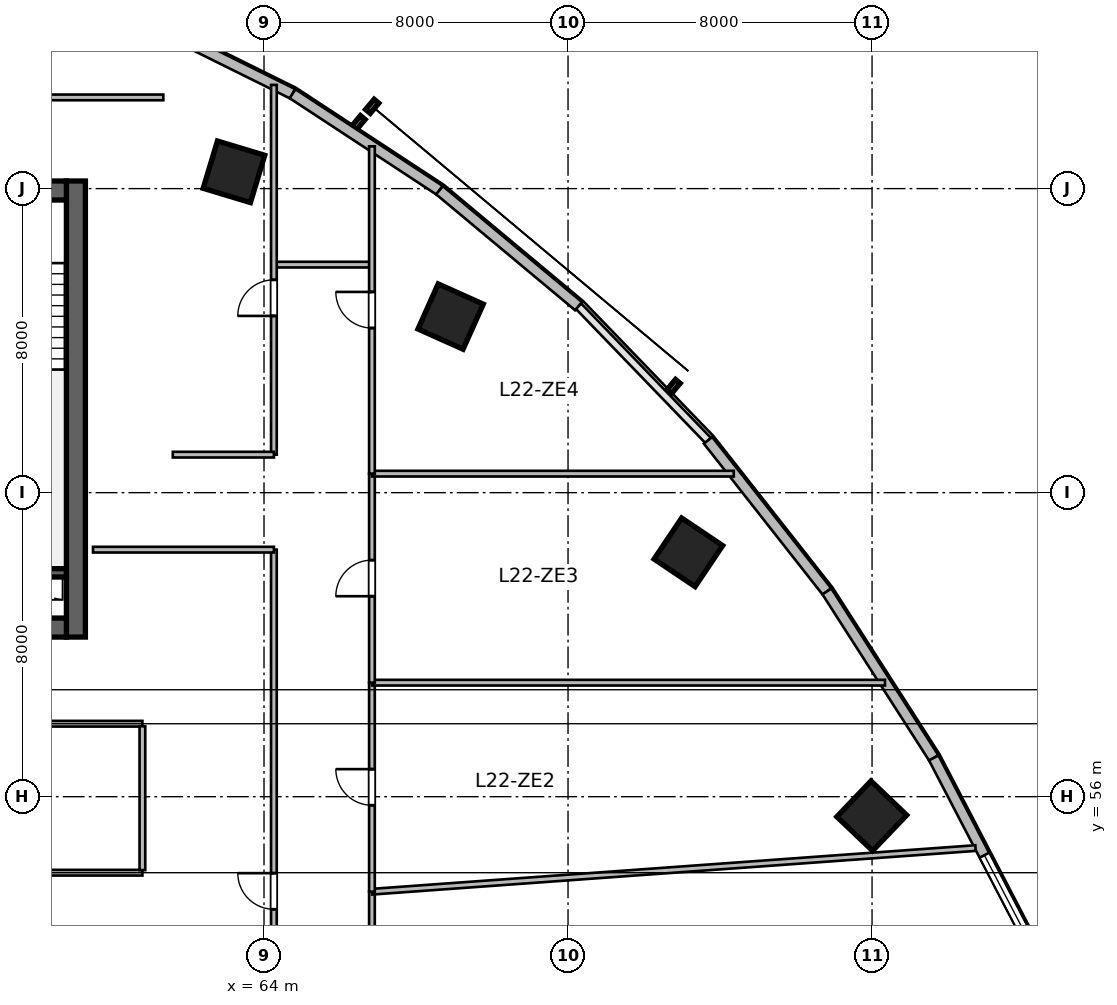
"""IFC4 building model, lengths in metres.
Left out: names, types, materials, properties, quantities, classifications, styles, units other than length and angle.
Written with IfcOpenShell. Run it as: python <this file> out.ifc"""

import sys

from ifc_helpers import new_model, si_unit, direction, frame, frame_2d, origin, origin_2d, place, context, subcontext, project, spatial, rectangle, extrude, source, transform, mapped, element, fill, save


model = new_model("IFC4")
c1 = context("Model", 3, precision=1e-05, world=origin(), true_north=direction((0.0, 1.0)))
c2 = subcontext(c1, "Body", "Model", "MODEL_VIEW")
j1 = project(units=[si_unit("LENGTHUNIT", "METRE"), si_unit("PLANEANGLEUNIT", "RADIAN")], contexts=[c1])
p1 = place(None, origin())
s1 = spatial("IfcSite", under=j1, at=p1, CompositionType="ELEMENT")
p2 = place(p1, origin())
s2 = spatial("IfcBuilding", under=s1, at=p2, CompositionType="ELEMENT")
p3 = place(p2, frame((0.0, 0.0, 96.0)))
s3 = spatial("IfcBuildingStorey", under=s2, at=p3, CompositionType="ELEMENT", Elevation=96.0)
m1 = source(origin(), c2, "Body", "SweptSolid", [
    extrude(rectangle(XDim=12.0, YDim=0.5, at=frame_2d((6.0, 0.0))), origin(), (0.0, 0.0, 1.0), 3.9),
])
p4 = place(p3, frame((59.05, 60.2, 0.0), z_axis=(0.0, 0.0, 1.0), x_axis=(0.0, 1.0, 0.0)))
e1 = element("IfcWall", 1, at=p4, inside=s3, PredefinedType="SHEAR", context=c2, shape_type="MappedRepresentation", body=[
    mapped(m1, transform((0.0, 0.0, 0.0), scale=1.0)),
])
m2 = source(origin(), c2, "Body", "SweptSolid", [
    extrude(rectangle(XDim=21.6, YDim=0.5, at=frame_2d((10.8, 0.0))), origin(), (0.0, 0.0, 1.0), 3.9),
])
p5 = place(p3, frame((37.2, 60.45, 0.0), z_axis=(0.0, 0.0, 1.0), x_axis=(1.0, 0.0, 0.0)))
e2 = element("IfcWall", 2, at=p5, inside=s3, PredefinedType="SHEAR", context=c2, shape_type="MappedRepresentation", body=[
    mapped(m2, transform((0.0, 0.0, 0.0), scale=1.0)),
])
p6 = place(p5, frame((1.1, 0.0, 0.0)))
e3 = element("IfcOpeningElement", 3, at=p6, cuts=e2, PredefinedType="OPENING", context=c2, shape_type="SweptSolid", body=[
    extrude(rectangle(XDim=1.15, YDim=2.15, at=frame_2d((0.575, 1.075))), frame((0.0, 0.26, 0.0), z_axis=(0.0, -1.0, 0.0), x_axis=(1.0, 0.0, 0.0)), (0.0, 0.0, 1.0), 0.52),
])
p7 = place(p5, frame((19.5, 0.0, 0.0)))
e4 = element("IfcOpeningElement", 4, at=p7, cuts=e2, PredefinedType="OPENING", context=c2, shape_type="SweptSolid", body=[
    extrude(rectangle(XDim=0.9, YDim=2.1, at=frame_2d((0.45, 1.05))), frame((0.0, 0.26, 0.0), z_axis=(0.0, -1.0, 0.0), x_axis=(1.0, 0.0, 0.0)), (0.0, 0.0, 1.0), 0.52),
])
p8 = place(p5, frame((12.02, 0.0, 0.0)))
e5 = element("IfcOpeningElement", 5, at=p8, cuts=e2, PredefinedType="OPENING", context=c2, shape_type="SweptSolid", body=[
    extrude(rectangle(XDim=1.6, YDim=2.15, at=frame_2d((0.8, 1.075))), frame((0.0, 0.26, 0.0), z_axis=(0.0, -1.0, 0.0), x_axis=(1.0, 0.0, 0.0)), (0.0, 0.0, 1.0), 0.52),
])
p9 = place(p3, frame((37.2, 71.95, 0.0), z_axis=(0.0, 0.0, 1.0), x_axis=(1.0, 0.0, 0.0)))
e6 = element("IfcWall", 6, at=p9, inside=s3, PredefinedType="SHEAR", context=c2, shape_type="MappedRepresentation", body=[
    mapped(m2, transform((0.0, 0.0, 0.0), scale=1.0)),
])
p10 = place(p9, frame((1.2, 0.0, 0.0)))
e7 = element("IfcOpeningElement", 7, at=p10, cuts=e6, PredefinedType="OPENING", context=c2, shape_type="SweptSolid", body=[
    extrude(rectangle(XDim=0.9, YDim=2.1, at=frame_2d((0.45, 1.05))), frame((0.0, 0.26, 0.0), z_axis=(0.0, -1.0, 0.0), x_axis=(1.0, 0.0, 0.0)), (0.0, 0.0, 1.0), 0.52),
])
p11 = place(p9, frame((14.7, 0.0, 0.0)))
e8 = element("IfcOpeningElement", 8, at=p11, cuts=e6, PredefinedType="OPENING", context=c2, shape_type="SweptSolid", body=[
    extrude(rectangle(XDim=1.2, YDim=2.15, at=frame_2d((0.6, 1.075))), frame((0.0, 0.26, 0.0), z_axis=(0.0, -1.0, 0.0), x_axis=(1.0, 0.0, 0.0)), (0.0, 0.0, 1.0), 0.52),
])
p12 = place(p9, frame((4.15, 0.0, 0.0)))
e9 = element("IfcOpeningElement", 9, at=p12, cuts=e6, PredefinedType="OPENING", context=c2, shape_type="SweptSolid", body=[
    extrude(rectangle(XDim=1.3, YDim=2.15, at=frame_2d((0.65, 1.075))), frame((0.0, 0.26, 0.0), z_axis=(0.0, -1.0, 0.0), x_axis=(1.0, 0.0, 0.0)), (0.0, 0.0, 1.0), 0.52),
])
p13 = place(p9, frame((7.1, 0.0, 0.0)))
e10 = element("IfcOpeningElement", 10, at=p13, cuts=e6, PredefinedType="OPENING", context=c2, shape_type="SweptSolid", body=[
    extrude(rectangle(XDim=0.9, YDim=2.1, at=frame_2d((0.45, 1.05))), frame((0.0, 0.26, 0.0), z_axis=(0.0, -1.0, 0.0), x_axis=(1.0, 0.0, 0.0)), (0.0, 0.0, 1.0), 0.52),
])
m3 = source(origin(), c2, "Body", "SweptSolid", [
    extrude(rectangle(XDim=3.27, YDim=0.22, at=frame_2d((1.635, 0.0))), origin(), (0.0, 0.0, 1.0), 3.9),
])
p14 = place(p3, frame((55.53, 61.89, 0.0), z_axis=(0.0, 0.0, 1.0), x_axis=(1.0, 0.0, 0.0)))
e11 = element("IfcWall", 11, at=p14, inside=s3, PredefinedType="SHEAR", context=c2, shape_type="MappedRepresentation", body=[
    mapped(m3, transform((0.0, 0.0, 0.0), scale=1.0)),
])
m4 = source(origin(), c2, "Body", "SweptSolid", [
    extrude(rectangle(XDim=1.3, YDim=1.3, at=origin_2d()), origin(), (0.0, 0.0, 1.0), 3.9),
])
for number, where, z_axis, x_axis in (
    (12, (63.209, 72.442, 0.0), (0.0, 0.0, 1.0), (0.289, 0.957, 0.0)),
    (13, (68.91, 68.633, 0.0), (0.0, 0.0, 1.0), (0.409, 0.912, 0.0)),
    (14, (75.167, 62.43, 0.0), (0.0, 0.0, 1.0), (0.558, 0.83, 0.0)),
    (15, (79.993, 55.494, 0.0), (0.0, 0.0, 1.0), (0.691, 0.723, 0.0)),
):
    element("IfcColumn", number, at=place(p3, frame(where, z_axis=z_axis, x_axis=x_axis)), inside=s3, PredefinedType="COLUMN", context=c2, shape_type="MappedRepresentation", body=[
        mapped(m4, transform((0.0, 0.0, 0.0), scale=1.0)),
    ])
m5 = source(origin(), c2, "Body", "SweptSolid", [
    extrude(rectangle(XDim=4.506, YDim=0.28, at=frame_2d((2.253, 0.0))), origin(), (0.0, 0.0, 1.0), 3.65),
])
p15 = place(p3, frame((60.714, 76.497, 0.0), z_axis=(0.0, 0.0, 1.0), x_axis=(0.89597155075, -0.444111450254, 0.0)))
e16 = element("IfcWall", 16, at=p15, inside=s3, PredefinedType="SOLIDWALL", context=c2, shape_type="MappedRepresentation", body=[
    mapped(m5, transform((0.0, 0.0, 0.0), scale=1.0)),
])
m6 = source(origin(), c2, "Body", "SweptSolid", [
    extrude(rectangle(XDim=4.626, YDim=0.28, at=frame_2d((2.313, 0.0))), origin(), (0.0, 0.0, 1.0), 3.65),
])
p16 = place(p3, frame((64.751, 74.496, 0.0), z_axis=(0.0, 0.0, 1.0), x_axis=(0.83595938331, -0.548791316855, 0.0)))
e17 = element("IfcWall", 17, at=p16, inside=s3, PredefinedType="SOLIDWALL", context=c2, shape_type="MappedRepresentation", body=[
    mapped(m6, transform((0.0, 0.0, 0.0), scale=1.0)),
])
m7 = source(origin(), c2, "Body", "SweptSolid", [
    extrude(rectangle(XDim=4.762, YDim=0.28, at=frame_2d((2.381, 0.0))), origin(), (0.0, 0.0, 1.0), 3.65),
])
p17 = place(p3, frame((68.618, 71.958, 0.0), z_axis=(0.0, 0.0, 1.0), x_axis=(0.767952279762, -0.640507061638, 0.0)))
e18 = element("IfcWall", 18, at=p17, inside=s3, PredefinedType="SOLIDWALL", context=c2, shape_type="MappedRepresentation", body=[
    mapped(m7, transform((0.0, 0.0, 0.0), scale=1.0)),
])
m8 = source(origin(), c2, "Body", "SweptSolid", [
    extrude(rectangle(XDim=5.058, YDim=0.28, at=frame_2d((2.529, 0.0))), origin(), (0.0, 0.0, 1.0), 3.65),
])
p18 = place(p3, frame((75.685, 65.376, 0.0), z_axis=(0.0, 0.0, 1.0), x_axis=(0.618145507434, -0.786063694391, 0.0)))
e19 = element("IfcWall", 19, at=p18, inside=s3, PredefinedType="SOLIDWALL", context=c2, shape_type="MappedRepresentation", body=[
    mapped(m8, transform((0.0, 0.0, 0.0), scale=1.0)),
])
m9 = source(origin(), c2, "Body", "SweptSolid", [
    extrude(rectangle(XDim=5.205, YDim=0.28, at=frame_2d((2.603, 0.0))), origin(), (0.0, 0.0, 1.0), 3.65),
])
p19 = place(p3, frame((78.812, 61.4, 0.0), z_axis=(0.0, 0.0, 1.0), x_axis=(0.540188528895, -0.8415440293, 0.0)))
e20 = element("IfcWall", 20, at=p19, inside=s3, PredefinedType="SOLIDWALL", context=c2, shape_type="MappedRepresentation", body=[
    mapped(m9, transform((0.0, 0.0, 0.0), scale=1.0)),
])
m10 = source(origin(), c2, "Body", "SweptSolid", [
    extrude(rectangle(XDim=5.315, YDim=0.28, at=frame_2d((2.658, 0.0))), origin(), (0.0, 0.0, 1.0), 3.65),
])
p20 = place(p3, frame((81.623, 57.02, 0.0), z_axis=(0.0, 0.0, 1.0), x_axis=(0.461760527822, -0.887004630735, 0.0)))
e21 = element("IfcWall", 21, at=p20, inside=s3, PredefinedType="SOLIDWALL", context=c2, shape_type="MappedRepresentation", body=[
    mapped(m10, transform((0.0, 0.0, 0.0), scale=1.0)),
])
p21 = place(p20, frame((2.886, 0.0, 0.95)))
e22 = element("IfcOpeningElement", 22, at=p21, cuts=e21, PredefinedType="OPENING", context=c2, shape_type="SweptSolid", body=[
    extrude(rectangle(XDim=2.2, YDim=2.1, at=frame_2d((1.1, 1.05))), frame((0.0, 0.15, 0.0), z_axis=(0.0, -1.0, 0.0), x_axis=(1.0, 0.0, 0.0)), (0.0, 0.0, 1.0), 0.3),
])
m11 = source(origin(), c2, "Body", "SweptSolid", [
    extrude(rectangle(XDim=6.6, YDim=0.15, at=frame_2d((3.3, 0.0))), origin(), (0.0, 0.0, 1.0), 3.095),
])
p22 = place(p3, frame((54.2, 54.0, 0.0), z_axis=(0.0, 0.0, 1.0), x_axis=(1.0, 0.0, 0.0)))
e23 = element("IfcWall", 23, at=p22, inside=s3, PredefinedType="PARTITIONING", context=c2, shape_type="MappedRepresentation", body=[
    mapped(m11, transform((0.0, 0.0, 0.0), scale=1.0)),
])
m12 = source(origin(), c2, "Body", "SweptSolid", [
    extrude(rectangle(XDim=6.6, YDim=0.15, at=frame_2d((3.3, 0.0))), origin(), (0.0, 0.0, 1.0), 3.65),
])
p23 = place(p3, frame((54.2, 57.92, 0.0), z_axis=(0.0, 0.0, 1.0), x_axis=(1.0, 0.0, 0.0)))
e24 = element("IfcWall", 24, at=p23, inside=s3, PredefinedType="PARTITIONING", context=c2, shape_type="MappedRepresentation", body=[
    mapped(m12, transform((0.0, 0.0, 0.0), scale=1.0)),
])
p24 = place(p23, frame((2.825, 0.0, 0.0)))
e25 = element("IfcOpeningElement", 25, at=p24, cuts=e24, PredefinedType="OPENING", context=c2, shape_type="SweptSolid", body=[
    extrude(rectangle(XDim=0.95, YDim=2.1, at=frame_2d((0.475, 1.05))), frame((0.0, 0.085, 0.0), z_axis=(0.0, -1.0, 0.0), x_axis=(1.0, 0.0, 0.0)), (0.0, 0.0, 1.0), 0.17),
])
m13 = source(origin(), c2, "Body", "SweptSolid", [
    extrude(rectangle(XDim=3.785, YDim=0.15, at=frame_2d((1.893, 0.0))), origin(), (0.0, 0.0, 1.0), 3.65),
])
p25 = place(p3, frame((60.8, 54.067, 0.0), z_axis=(0.0, 0.0, 1.0), x_axis=(0.0, 1.0, 0.0)))
e26 = element("IfcWall", 26, at=p25, inside=s3, PredefinedType="PARTITIONING", context=c2, shape_type="MappedRepresentation", body=[
    mapped(m13, transform((0.0, 0.0, 0.0), scale=1.0)),
])
m14 = source(origin(), c2, "Body", "SweptSolid", [
    extrude(rectangle(XDim=2.5, YDim=0.15, at=frame_2d((1.25, 0.0))), origin(), (0.0, 0.0, 1.0), 3.65),
])
p26 = place(p3, frame((64.3, 70.0, 0.0), z_axis=(0.0, 0.0, 1.0), x_axis=(1.0, 0.0, 0.0)))
e27 = element("IfcWall", 27, at=p26, inside=s3, PredefinedType="PARTITIONING", context=c2, shape_type="MappedRepresentation", body=[
    mapped(m14, transform((0.0, 0.0, 0.0), scale=1.0)),
])
m15 = source(origin(), c2, "Body", "SweptSolid", [
    extrude(rectangle(XDim=12.894, YDim=0.15, at=frame_2d((6.447, 0.0))), origin(), (0.0, 0.0, 1.0), 2.942),
])
p27 = place(p3, frame((66.84, 40.606, 0.0), z_axis=(0.0, 0.0, 1.0), x_axis=(0.0, 1.0, 0.0)))
e28 = element("IfcWall", 28, at=p27, inside=s3, PredefinedType="PARTITIONING", context=c2, shape_type="MappedRepresentation", body=[
    mapped(m15, transform((0.0, 0.0, 0.0), scale=1.0)),
])
p28 = place(p27, frame((9.744, 0.0, 0.0)))
e29 = element("IfcOpeningElement", 29, at=p28, cuts=e28, PredefinedType="OPENING", context=c2, shape_type="SweptSolid", body=[
    extrude(rectangle(XDim=0.95, YDim=2.1, at=frame_2d((0.475, 1.05))), frame((0.0, 0.085, 0.0), z_axis=(0.0, -1.0, 0.0), x_axis=(1.0, 0.0, 0.0)), (0.0, 0.0, 1.0), 0.17),
])
m16 = source(origin(), c2, "Body", "SweptSolid", [
    extrude(rectangle(XDim=15.924, YDim=0.15, at=frame_2d((7.962, 0.0))), origin(), (0.0, 0.0, 1.0), 3.65),
])
p29 = place(p3, frame((66.84, 53.5, 0.0), z_axis=(0.0, 0.0, 1.0), x_axis=(0.997397082693, 0.072104503572, 0.0)))
e30 = element("IfcWall", 30, at=p29, inside=s3, PredefinedType="PARTITIONING", context=c2, shape_type="MappedRepresentation", body=[
    mapped(m16, transform((0.0, 0.0, 0.0), scale=1.0)),
])
m17 = source(origin(), c2, "Body", "SweptSolid", [
    extrude(rectangle(XDim=5.5, YDim=0.15, at=frame_2d((2.75, 0.0))), origin(), (0.0, 0.0, 1.0), 3.022),
])
p30 = place(p3, frame((66.84, 53.5, 0.0), z_axis=(0.0, 0.0, 1.0), x_axis=(0.0, 1.0, 0.0)))
e31 = element("IfcWall", 31, at=p30, inside=s3, PredefinedType="PARTITIONING", context=c2, shape_type="MappedRepresentation", body=[
    mapped(m17, transform((0.0, 0.0, 0.0), scale=1.0)),
])
p31 = place(p30, frame((2.275, 0.0, 0.0)))
e32 = element("IfcOpeningElement", 32, at=p31, cuts=e31, PredefinedType="OPENING", context=c2, shape_type="SweptSolid", body=[
    extrude(rectangle(XDim=0.95, YDim=2.1, at=frame_2d((0.475, 1.05))), frame((0.0, 0.085, 0.0), z_axis=(0.0, -1.0, 0.0), x_axis=(1.0, 0.0, 0.0)), (0.0, 0.0, 1.0), 0.17),
])
m18 = source(origin(), c2, "Body", "SweptSolid", [
    extrude(rectangle(XDim=13.5, YDim=0.15, at=frame_2d((6.75, 0.0))), origin(), (0.0, 0.0, 1.0), 3.65),
])
p32 = place(p3, frame((66.84, 59.0, 0.0), z_axis=(0.0, 0.0, 1.0), x_axis=(1.0, 0.0, 0.0)))
e33 = element("IfcWall", 33, at=p32, inside=s3, PredefinedType="PARTITIONING", context=c2, shape_type="MappedRepresentation", body=[
    mapped(m18, transform((0.0, 0.0, 0.0), scale=1.0)),
])
m19 = source(origin(), c2, "Body", "SweptSolid", [
    extrude(rectangle(XDim=5.5, YDim=0.15, at=frame_2d((2.75, 0.0))), origin(), (0.0, 0.0, 1.0), 2.942),
])
p33 = place(p3, frame((66.84, 59.0, 0.0), z_axis=(0.0, 0.0, 1.0), x_axis=(0.0, 1.0, 0.0)))
e34 = element("IfcWall", 34, at=p33, inside=s3, PredefinedType="PARTITIONING", context=c2, shape_type="MappedRepresentation", body=[
    mapped(m19, transform((0.0, 0.0, 0.0), scale=1.0)),
])
p34 = place(p33, frame((2.275, 0.0, 0.0)))
e35 = element("IfcOpeningElement", 35, at=p34, cuts=e34, PredefinedType="OPENING", context=c2, shape_type="SweptSolid", body=[
    extrude(rectangle(XDim=0.95, YDim=2.1, at=frame_2d((0.475, 1.05))), frame((0.0, 0.085, 0.0), z_axis=(0.0, -1.0, 0.0), x_axis=(1.0, 0.0, 0.0)), (0.0, 0.0, 1.0), 0.17),
])
m20 = source(origin(), c2, "Body", "SweptSolid", [
    extrude(rectangle(XDim=9.521, YDim=0.15, at=frame_2d((4.761, 0.0))), origin(), (0.0, 0.0, 1.0), 3.65),
])
p35 = place(p3, frame((66.84, 64.5, 0.0), z_axis=(0.0, 0.0, 1.0), x_axis=(1.0, 0.0, 0.0)))
e36 = element("IfcWall", 36, at=p35, inside=s3, PredefinedType="PARTITIONING", context=c2, shape_type="MappedRepresentation", body=[
    mapped(m20, transform((0.0, 0.0, 0.0), scale=1.0)),
])
m21 = source(origin(), c2, "Body", "SweptSolid", [
    extrude(rectangle(XDim=8.613, YDim=0.15, at=frame_2d((4.307, 0.0))), origin(), (0.0, 0.0, 1.0), 3.65),
])
p36 = place(p3, frame((66.84, 64.5, 0.0), z_axis=(0.0, 0.0, 1.0), x_axis=(0.0, 1.0, 0.0)))
e37 = element("IfcWall", 37, at=p36, inside=s3, PredefinedType="PARTITIONING", context=c2, shape_type="MappedRepresentation", body=[
    mapped(m21, transform((0.0, 0.0, 0.0), scale=1.0)),
])
p37 = place(p36, frame((3.832, 0.0, 0.0)))
e38 = element("IfcOpeningElement", 38, at=p37, cuts=e37, PredefinedType="OPENING", context=c2, shape_type="SweptSolid", body=[
    extrude(rectangle(XDim=0.95, YDim=2.1, at=frame_2d((0.475, 1.05))), frame((0.0, 0.085, 0.0), z_axis=(0.0, -1.0, 0.0), x_axis=(1.0, 0.0, 0.0)), (0.0, 0.0, 1.0), 0.17),
])
m22 = source(origin(), c2, "Body", "SweptSolid", [
    extrude(rectangle(XDim=8.2, YDim=0.15, at=frame_2d((4.1, 0.0))), origin(), (0.0, 0.0, 1.0), 3.022),
])
p38 = place(p3, frame((53.15, 74.4, 0.0), z_axis=(0.0, 0.0, 1.0), x_axis=(1.0, 0.0, 0.0)))
e39 = element("IfcWall", 39, at=p38, inside=s3, PredefinedType="PARTITIONING", context=c2, shape_type="MappedRepresentation", body=[
    mapped(m22, transform((0.0, 0.0, 0.0), scale=1.0)),
])
p39 = place(p38, frame((3.625, 0.0, 0.0)))
e40 = element("IfcOpeningElement", 40, at=p39, cuts=e39, PredefinedType="OPENING", context=c2, shape_type="SweptSolid", body=[
    extrude(rectangle(XDim=0.95, YDim=2.1, at=frame_2d((0.475, 1.05))), frame((0.0, 0.085, 0.0), z_axis=(0.0, -1.0, 0.0), x_axis=(1.0, 0.0, 0.0)), (0.0, 0.0, 1.0), 0.17),
])
m23 = source(origin(), c2, "Body", "SweptSolid", [
    extrude(rectangle(XDim=17.974, YDim=0.15, at=frame_2d((8.987, 0.0))), origin(), (0.0, 0.0, 1.0), 2.942),
])
p40 = place(p3, frame((64.26, 44.526, 0.0), z_axis=(0.0, 0.0, 1.0), x_axis=(0.0, 1.0, 0.0)))
e41 = element("IfcWall", 41, at=p40, inside=s3, PredefinedType="PARTITIONING", context=c2, shape_type="MappedRepresentation", body=[
    mapped(m23, transform((0.0, 0.0, 0.0), scale=1.0)),
])
p41 = place(p40, frame((8.512, 0.0, 0.0)))
e42 = element("IfcOpeningElement", 42, at=p41, cuts=e41, PredefinedType="OPENING", context=c2, shape_type="SweptSolid", body=[
    extrude(rectangle(XDim=0.95, YDim=2.1, at=frame_2d((0.475, 1.05))), frame((0.0, 0.085, 0.0), z_axis=(0.0, -1.0, 0.0), x_axis=(1.0, 0.0, 0.0)), (0.0, 0.0, 1.0), 0.17),
])
m24 = source(origin(), c2, "Body", "SweptSolid", [
    extrude(rectangle(XDim=4.76, YDim=0.15, at=frame_2d((2.38, 0.0))), origin(), (0.0, 0.0, 1.0), 3.65),
])
p42 = place(p3, frame((59.5, 62.5, 0.0), z_axis=(0.0, 0.0, 1.0), x_axis=(1.0, 0.0, 0.0)))
e43 = element("IfcWall", 43, at=p42, inside=s3, PredefinedType="PARTITIONING", context=c2, shape_type="MappedRepresentation", body=[
    mapped(m24, transform((0.0, 0.0, 0.0), scale=1.0)),
])
m25 = source(origin(), c2, "Body", "SweptSolid", [
    extrude(rectangle(XDim=9.729, YDim=0.15, at=frame_2d((4.864, 0.0))), origin(), (0.0, 0.0, 1.0), 3.65),
])
p43 = place(p3, frame((64.26, 65.0, 0.0), z_axis=(0.0, 0.0, 1.0), x_axis=(0.0, 1.0, 0.0)))
e44 = element("IfcWall", 44, at=p43, inside=s3, PredefinedType="PARTITIONING", context=c2, shape_type="MappedRepresentation", body=[
    mapped(m25, transform((0.0, 0.0, 0.0), scale=1.0)),
])
p44 = place(p43, frame((3.65, 0.0, 0.0)))
e45 = element("IfcOpeningElement", 45, at=p44, cuts=e44, PredefinedType="OPENING", context=c2, shape_type="SweptSolid", body=[
    extrude(rectangle(XDim=0.95, YDim=2.1, at=frame_2d((0.475, 1.05))), frame((0.0, 0.085, 0.0), z_axis=(0.0, -1.0, 0.0), x_axis=(1.0, 0.0, 0.0)), (0.0, 0.0, 1.0), 0.17),
])
m26 = source(origin(), c2, "Body", "SweptSolid", [
    extrude(rectangle(XDim=2.66, YDim=0.15, at=frame_2d((1.33, 0.0))), origin(), (0.0, 0.0, 1.0), 3.65),
])
p45 = place(p3, frame((61.6, 65.0, 0.0), z_axis=(0.0, 0.0, 1.0), x_axis=(1.0, 0.0, 0.0)))
e46 = element("IfcWall", 46, at=p45, inside=s3, PredefinedType="PARTITIONING", context=c2, shape_type="MappedRepresentation", body=[
    mapped(m26, transform((0.0, 0.0, 0.0), scale=1.0)),
])
m27 = source(origin(), c2, "Body", "SweptSolid", [
    extrude(rectangle(XDim=2.2, YDim=2.1, at=frame_2d((1.1, 1.05))), frame((0.0, 0.03, 0.0), z_axis=(0.0, -1.0, 0.0), x_axis=(1.0, 0.0, 0.0)), (0.0, 0.0, 1.0), 0.06),
])
p46 = place(p21, origin())
e47 = element("IfcWindow", 47, at=p46, inside=s3, PartitioningType="TRIPLE_PANEL_VERTICAL", PredefinedType="WINDOW", context=c2, shape_type="MappedRepresentation", body=[
    mapped(m27, transform((0.0, 0.0, 0.0), scale=1.0)),
])
fill(e22, e47)
m28 = source(origin(), c2, "Body", "SweptSolid", [
    extrude(rectangle(XDim=0.95, YDim=2.1, at=frame_2d((0.475, 1.05))), frame((0.0, 0.025, 0.0), z_axis=(0.0, -1.0, 0.0), x_axis=(1.0, 0.0, 0.0)), (0.0, 0.0, 1.0), 0.05),
])
p47 = place(p31, origin())
e48 = element("IfcDoor", 48, at=p47, inside=s3, OperationType="SINGLE_SWING_RIGHT", PredefinedType="DOOR", context=c2, shape_type="MappedRepresentation", body=[
    mapped(m28, transform((0.0, 0.0, 0.0), scale=1.0)),
])
fill(e32, e48)
p48 = place(p34, origin())
e49 = element("IfcDoor", 49, at=p48, inside=s3, OperationType="SINGLE_SWING_LEFT", PredefinedType="DOOR", context=c2, shape_type="MappedRepresentation", body=[
    mapped(m28, transform((0.0, 0.0, 0.0), scale=1.0)),
])
fill(e35, e49)
p49 = place(p37, origin())
e50 = element("IfcDoor", 50, at=p49, inside=s3, OperationType="SINGLE_SWING_RIGHT", PredefinedType="DOOR", context=c2, shape_type="MappedRepresentation", body=[
    mapped(m28, transform((0.0, 0.0, 0.0), scale=1.0)),
])
fill(e38, e50)
p50 = place(p41, origin())
e51 = element("IfcDoor", 51, at=p50, inside=s3, OperationType="SINGLE_SWING_RIGHT", PredefinedType="DOOR", context=c2, shape_type="MappedRepresentation", body=[
    mapped(m28, transform((0.0, 0.0, 0.0), scale=1.0)),
])
fill(e42, e51)
p51 = place(p44, origin())
e52 = element("IfcDoor", 52, at=p51, inside=s3, OperationType="SINGLE_SWING_LEFT", PredefinedType="DOOR", context=c2, shape_type="MappedRepresentation", body=[
    mapped(m28, transform((0.0, 0.0, 0.0), scale=1.0)),
])
fill(e45, e52)
save(model, sys.argv[1])
